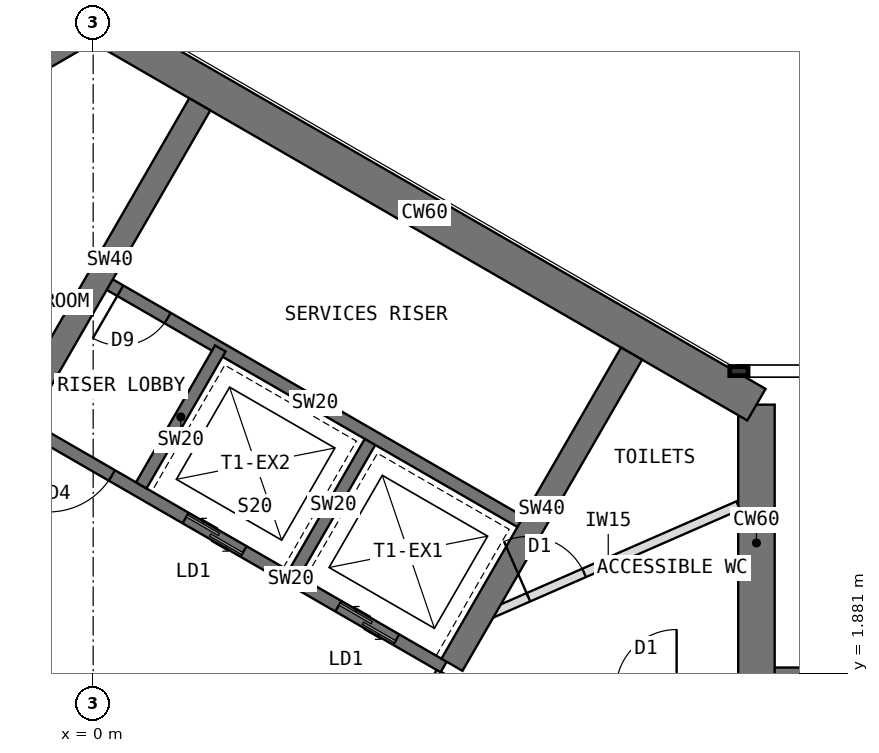
"""IFC4 building model, lengths in metres.
Left out: names, types, materials, properties, quantities, classifications, styles, units other than length and angle.
Written with IfcOpenShell. Run it as: python <this file> out.ifc"""

import sys

from ifc_helpers import new_model, si_unit, direction, frame, frame_2d, origin, place, context, subcontext, project, spatial, rectangle, extrude, element, fill, save


model = new_model("IFC4")
c1 = context("Model", 3, precision=1e-05, world=origin(), true_north=direction((0.0, 1.0)))
c2 = subcontext(c1, "Body", "Model", "MODEL_VIEW")
j1 = project(units=[si_unit("LENGTHUNIT", "METRE"), si_unit("PLANEANGLEUNIT", "RADIAN")], contexts=[c1])
p1 = place(None, origin())
s1 = spatial("IfcSite", under=j1, at=p1, CompositionType="ELEMENT")
p2 = place(p1, origin())
s2 = spatial("IfcBuilding", under=s1, at=p2, CompositionType="ELEMENT")
p3 = place(p2, frame((0.0, 0.0, 97.5)))
s3 = spatial("IfcBuildingStorey", under=s2, at=p3, CompositionType="ELEMENT", Elevation=97.5)
p4 = place(p3, frame((10.908, 1.75, 0.0), z_axis=(0.0, 0.0, 1.0), x_axis=(0.0, 1.0, 0.0)))
e1 = element("IfcWall", 1, at=p4, inside=s3, PredefinedType="SHEAR", context=c2, shape_type="SweptSolid", body=[
    extrude(rectangle(XDim=4.548, YDim=0.6, at=frame_2d((2.274, 0.0))), origin(), (0.0, 0.0, 1.0), 4.0),
])
p5 = place(p3, frame((10.908, 6.298, 0.0), z_axis=(0.0, 0.0, 1.0), x_axis=(-0.866021940709, 0.500005998175, 0.0)))
e2 = element("IfcWall", 2, at=p5, inside=s3, PredefinedType="SHEAR", context=c2, shape_type="SweptSolid", body=[
    extrude(rectangle(XDim=12.596, YDim=0.6, at=frame_2d((6.298, 0.0))), origin(), (0.0, 0.0, 1.0), 4.0),
])
p6 = place(p3, frame((0.0, 12.596, 0.0), z_axis=(0.0, 0.0, 1.0), x_axis=(-0.866011268655, -0.500024481964, 0.0)))
e3 = element("IfcWall", 3, at=p6, inside=s3, PredefinedType="SHEAR", context=c2, shape_type="SweptSolid", body=[
    extrude(rectangle(XDim=4.548, YDim=0.6, at=frame_2d((2.274, 0.0))), origin(), (0.0, 0.0, 1.0), 4.0),
])
p7 = place(p3, frame((10.908, 1.75, 0.0), z_axis=(0.0, 0.0, 1.0), x_axis=(1.0, 0.0, 0.0)))
e4 = element("IfcWall", 4, at=p7, inside=s3, PredefinedType="SHEAR", context=c2, shape_type="SweptSolid", body=[
    extrude(rectangle(XDim=2.592, YDim=0.45, at=frame_2d((1.296, 0.0))), origin(), (0.0, 0.0, 1.0), 4.0),
])
p8 = place(p3, frame((5.764, 1.984, 0.0), z_axis=(0.0, 0.0, 1.0), x_axis=(-0.866026010844, 0.49999894854, 0.0)))
e5 = element("IfcWall", 5, at=p8, inside=s3, PredefinedType="SHEAR", context=c2, shape_type="SweptSolid", body=[
    extrude(rectangle(XDim=8.0, YDim=0.2, at=frame_2d((4.0, 0.0))), origin(), (0.0, 0.0, 1.0), 4.0),
])
p9 = place(p8, frame((6.3, 0.0, 0.0)))
e6 = element("IfcOpeningElement", 6, at=p9, cuts=e5, PredefinedType="OPENING", context=c2, shape_type="SweptSolid", body=[
    extrude(rectangle(XDim=1.2, YDim=2.1, at=frame_2d((0.6, 1.05))), frame((0.0, 0.11, 0.0), z_axis=(0.0, -1.0, 0.0), x_axis=(1.0, 0.0, 0.0)), (0.0, 0.0, 1.0), 0.22),
])
p10 = place(p8, frame((0.9, 0.0, 0.0)))
e7 = element("IfcOpeningElement", 7, at=p10, cuts=e5, PredefinedType="OPENING", context=c2, shape_type="SweptSolid", body=[
    extrude(rectangle(XDim=1.1, YDim=2.2, at=frame_2d((0.55, 1.1))), frame((0.0, 0.11, 0.0), z_axis=(0.0, -1.0, 0.0), x_axis=(1.0, 0.0, 0.0)), (0.0, 0.0, 1.0), 0.22),
])
p11 = place(p8, frame((3.8, 0.0, 0.0)))
e8 = element("IfcOpeningElement", 8, at=p11, cuts=e5, PredefinedType="OPENING", context=c2, shape_type="SweptSolid", body=[
    extrude(rectangle(XDim=1.1, YDim=2.2, at=frame_2d((0.55, 1.1))), frame((0.0, 0.11, 0.0), z_axis=(0.0, -1.0, 0.0), x_axis=(1.0, 0.0, 0.0)), (0.0, 0.0, 1.0), 0.22),
])
for number, where, z_axis, x_axis in (
    (9, (3.303, 3.52, 0.0), (0.0, 0.0, 1.0), (0.5, 0.866, 0.0)),
    (10, (0.791, 4.97, 0.0), (0.0, 0.0, 1.0), (0.5, 0.866, 0.0)),
):
    element("IfcWall", number, at=place(p3, frame(where, z_axis=z_axis, x_axis=x_axis)), inside=s3, PredefinedType="SHEAR", context=c2, shape_type="SweptSolid", body=[
        extrude(rectangle(XDim=2.6, YDim=0.2, at=frame_2d((1.3, 0.0))), origin(), (0.0, 0.0, 1.0), 4.0),
    ])
p12 = place(p3, frame((7.114, 4.322, 0.0), z_axis=(0.0, 0.0, 1.0), x_axis=(-0.866026010844, 0.49999894854, 0.0)))
e11 = element("IfcWall", 11, at=p12, inside=s3, PredefinedType="SHEAR", context=c2, shape_type="SweptSolid", body=[
    extrude(rectangle(XDim=8.0, YDim=0.2, at=frame_2d((4.0, 0.0))), origin(), (0.0, 0.0, 1.0), 4.0),
])
p13 = place(p12, frame((6.8, 0.0, 0.0)))
e12 = element("IfcOpeningElement", 12, at=p13, cuts=e11, PredefinedType="OPENING", context=c2, shape_type="SweptSolid", body=[
    extrude(rectangle(XDim=0.9, YDim=2.1, at=frame_2d((0.45, 1.05))), frame((0.0, 0.11, 0.0), z_axis=(0.0, -1.0, 0.0), x_axis=(1.0, 0.0, 0.0)), (0.0, 0.0, 1.0), 0.22),
])
p14 = place(p3, frame((-1.201, 6.12, 0.0), z_axis=(0.0, 0.0, 1.0), x_axis=(0.49999668571, 0.866027317282, 0.0)))
e13 = element("IfcWall", 13, at=p14, inside=s3, PredefinedType="SHEAR", context=c2, shape_type="SweptSolid", body=[
    extrude(rectangle(XDim=5.908, YDim=0.4, at=frame_2d((2.954, 0.0))), origin(), (0.0, 0.0, 1.0), 4.0),
])
p15 = place(p3, frame((5.901, 2.02, 0.0), z_axis=(0.0, 0.0, 1.0), x_axis=(0.500027676417, 0.866009424208, 0.0)))
e14 = element("IfcWall", 14, at=p15, inside=s3, PredefinedType="SHEAR", context=c2, shape_type="SweptSolid", body=[
    extrude(rectangle(XDim=5.908, YDim=0.4, at=frame_2d((2.954, 0.0))), origin(), (0.0, 0.0, 1.0), 4.0),
])
p16 = place(p3, frame((5.719, 1.906, 0.0), z_axis=(0.0, 0.0, 1.0), x_axis=(-0.499590185398, -0.866261881104, 0.0)))
e15 = element("IfcWall", 15, at=p16, inside=s3, PredefinedType="PARTITIONING", context=c2, shape_type="SweptSolid", body=[
    extrude(rectangle(XDim=0.373, YDim=0.15, at=frame_2d((0.187, 0.0))), origin(), (0.0, 0.0, 1.0), 3.8),
])
p17 = place(p3, frame((6.333, 2.77, 0.0), z_axis=(0.0, 0.0, 1.0), x_axis=(0.916207765353, 0.400703544664, 0.0)))
e16 = element("IfcWall", 16, at=p17, inside=s3, PredefinedType="PARTITIONING", context=c2, shape_type="SweptSolid", body=[
    extrude(rectangle(XDim=4.666, YDim=0.15, at=frame_2d((2.333, 0.0))), origin(), (0.0, 0.0, 1.0), 3.8),
])
p18 = place(p17, frame((0.9, 0.0, 0.0)))
e17 = element("IfcOpeningElement", 17, at=p18, cuts=e16, PredefinedType="OPENING", context=c2, shape_type="SweptSolid", body=[
    extrude(rectangle(XDim=1.0, YDim=2.1, at=frame_2d((0.5, 1.05))), frame((0.0, 0.085, 0.0), z_axis=(0.0, -1.0, 0.0), x_axis=(1.0, 0.0, 0.0)), (0.0, 0.0, 1.0), 0.17),
])
p19 = place(p9, origin())
e18 = element("IfcDoor", 18, at=p19, inside=s3, OperationType="SINGLE_SWING_RIGHT", PredefinedType="DOOR", context=c2, shape_type="SweptSolid", body=[
    extrude(rectangle(XDim=1.2, YDim=2.1, at=frame_2d((0.6, 1.05))), frame((0.0, 0.025, 0.0), z_axis=(0.0, -1.0, 0.0), x_axis=(1.0, 0.0, 0.0)), (0.0, 0.0, 1.0), 0.05),
])
fill(e6, e18)
p20 = place(p10, origin())
e19 = element("IfcDoor", 19, at=p20, inside=s3, OperationType="DOUBLE_DOOR_SLIDING", PredefinedType="DOOR", context=c2, shape_type="SweptSolid", body=[
    extrude(rectangle(XDim=1.1, YDim=2.2, at=frame_2d((0.55, 1.1))), frame((0.0, 0.025, 0.0), z_axis=(0.0, -1.0, 0.0), x_axis=(1.0, 0.0, 0.0)), (0.0, 0.0, 1.0), 0.05),
])
fill(e7, e19)
p21 = place(p11, origin())
e20 = element("IfcDoor", 20, at=p21, inside=s3, OperationType="DOUBLE_DOOR_SLIDING", PredefinedType="DOOR", context=c2, shape_type="SweptSolid", body=[
    extrude(rectangle(XDim=1.1, YDim=2.2, at=frame_2d((0.55, 1.1))), frame((0.0, 0.025, 0.0), z_axis=(0.0, -1.0, 0.0), x_axis=(1.0, 0.0, 0.0)), (0.0, 0.0, 1.0), 0.05),
])
fill(e8, e20)
p22 = place(p13, origin())
e21 = element("IfcDoor", 21, at=p22, inside=s3, OperationType="SINGLE_SWING_RIGHT", PredefinedType="DOOR", context=c2, shape_type="SweptSolid", body=[
    extrude(rectangle(XDim=0.9, YDim=2.1, at=frame_2d((0.45, 1.05))), frame((0.0, 0.025, 0.0), z_axis=(0.0, -1.0, 0.0), x_axis=(1.0, 0.0, 0.0)), (0.0, 0.0, 1.0), 0.05),
])
fill(e12, e21)
p23 = place(p18, origin())
e22 = element("IfcDoor", 22, at=p23, inside=s3, OperationType="SINGLE_SWING_LEFT", PredefinedType="DOOR", context=c2, shape_type="SweptSolid", body=[
    extrude(rectangle(XDim=1.0, YDim=2.1, at=frame_2d((0.5, 1.05))), frame((0.0, 0.025, 0.0), z_axis=(0.0, -1.0, 0.0), x_axis=(1.0, 0.0, 0.0)), (0.0, 0.0, 1.0), 0.05),
])
fill(e17, e22)
save(model, sys.argv[1])
